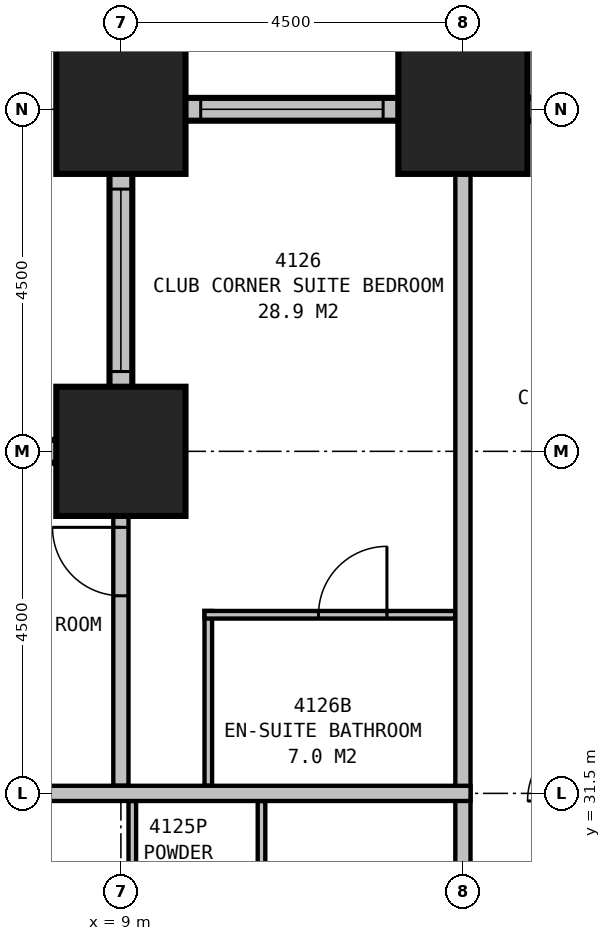
"""IFC4 building model, lengths in metres.
Left out: names, types, materials, properties, quantities, classifications, styles, units other than length and angle.
Written with IfcOpenShell. Run it as: python <this file> out.ifc"""

import sys

from ifc_helpers import new_model, si_unit, direction, frame, frame_2d, origin, origin_2d, place, context, subcontext, project, spatial, rectangle, extrude, element, fill, save


model = new_model("IFC4")
c1 = context("Model", 3, precision=1e-05, world=origin(), true_north=direction((0.0, 1.0)))
c2 = subcontext(c1, "Body", "Model", "MODEL_VIEW")
j1 = project(units=[si_unit("LENGTHUNIT", "METRE"), si_unit("PLANEANGLEUNIT", "RADIAN")], contexts=[c1])
p1 = place(None, origin())
s1 = spatial("IfcSite", under=j1, at=p1, CompositionType="ELEMENT")
p2 = place(p1, origin())
s2 = spatial("IfcBuilding", under=s1, at=p2, CompositionType="ELEMENT")
p3 = place(p2, frame((0.0, 0.0, 162.4)))
s3 = spatial("IfcBuildingStorey", under=s2, at=p3, CompositionType="ELEMENT", Elevation=162.4)
for number, where, z_axis, x_axis in (
    (1, (13.5, 40.5, 0.0), (0.0, 0.0, 1.0), (1.0, 0.0, 0.0)),
    (2, (9.0, 40.5, 0.0), (0.0, 0.0, 1.0), (1.0, 0.0, 0.0)),
    (3, (9.0, 36.0, 0.0), (0.0, 0.0, 1.0), (1.0, 0.0, 0.0)),
):
    element("IfcColumn", number, at=place(p3, frame(where, z_axis=z_axis, x_axis=x_axis)), inside=s3, PredefinedType="COLUMN", context=c2, shape_type="SweptSolid", body=[
        extrude(rectangle(XDim=1.7, YDim=1.7, at=origin_2d()), origin(), (0.0, 0.0, 1.0), 3.5),
    ])
p4 = place(p3, frame((40.65, 40.5, 0.0), z_axis=(0.0, 0.0, 1.0), x_axis=(-1.0, 0.0, 0.0)))
e4 = element("IfcWall", 4, at=p4, inside=s3, PredefinedType="STANDARD", context=c2, shape_type="SweptSolid", body=[
    extrude(rectangle(XDim=31.8, YDim=0.3, at=frame_2d((15.9, 0.0))), origin(), (0.0, 0.0, 1.0), 2.25),
])
p5 = place(p4, frame((1.2, 0.0, 0.5)))
e5 = element("IfcOpeningElement", 5, at=p5, cuts=e4, PredefinedType="OPENING", context=c2, shape_type="SweptSolid", body=[
    extrude(rectangle(XDim=2.4, YDim=1.6, at=frame_2d((1.2, 0.8))), frame((0.0, 0.16, 0.0), z_axis=(0.0, -1.0, 0.0), x_axis=(1.0, 0.0, 0.0)), (0.0, 0.0, 1.0), 0.32),
])
p6 = place(p4, frame((5.7, 0.0, 0.5)))
e6 = element("IfcOpeningElement", 6, at=p6, cuts=e4, PredefinedType="OPENING", context=c2, shape_type="SweptSolid", body=[
    extrude(rectangle(XDim=2.4, YDim=1.6, at=frame_2d((1.2, 0.8))), frame((0.0, 0.16, 0.0), z_axis=(0.0, -1.0, 0.0), x_axis=(1.0, 0.0, 0.0)), (0.0, 0.0, 1.0), 0.32),
])
p7 = place(p4, frame((10.2, 0.0, 0.5)))
e7 = element("IfcOpeningElement", 7, at=p7, cuts=e4, PredefinedType="OPENING", context=c2, shape_type="SweptSolid", body=[
    extrude(rectangle(XDim=2.4, YDim=1.6, at=frame_2d((1.2, 0.8))), frame((0.0, 0.16, 0.0), z_axis=(0.0, -1.0, 0.0), x_axis=(1.0, 0.0, 0.0)), (0.0, 0.0, 1.0), 0.32),
])
p8 = place(p4, frame((14.7, 0.0, 0.5)))
e8 = element("IfcOpeningElement", 8, at=p8, cuts=e4, PredefinedType="OPENING", context=c2, shape_type="SweptSolid", body=[
    extrude(rectangle(XDim=2.4, YDim=1.6, at=frame_2d((1.2, 0.8))), frame((0.0, 0.16, 0.0), z_axis=(0.0, -1.0, 0.0), x_axis=(1.0, 0.0, 0.0)), (0.0, 0.0, 1.0), 0.32),
])
p9 = place(p4, frame((19.2, 0.0, 0.5)))
e9 = element("IfcOpeningElement", 9, at=p9, cuts=e4, PredefinedType="OPENING", context=c2, shape_type="SweptSolid", body=[
    extrude(rectangle(XDim=2.4, YDim=1.6, at=frame_2d((1.2, 0.8))), frame((0.0, 0.16, 0.0), z_axis=(0.0, -1.0, 0.0), x_axis=(1.0, 0.0, 0.0)), (0.0, 0.0, 1.0), 0.32),
])
p10 = place(p4, frame((23.7, 0.0, 0.5)))
e10 = element("IfcOpeningElement", 10, at=p10, cuts=e4, PredefinedType="OPENING", context=c2, shape_type="SweptSolid", body=[
    extrude(rectangle(XDim=2.4, YDim=1.6, at=frame_2d((1.2, 0.8))), frame((0.0, 0.16, 0.0), z_axis=(0.0, -1.0, 0.0), x_axis=(1.0, 0.0, 0.0)), (0.0, 0.0, 1.0), 0.32),
])
p11 = place(p4, frame((28.2, 0.0, 0.5)))
e11 = element("IfcOpeningElement", 11, at=p11, cuts=e4, PredefinedType="OPENING", context=c2, shape_type="SweptSolid", body=[
    extrude(rectangle(XDim=2.4, YDim=1.6, at=frame_2d((1.2, 0.8))), frame((0.0, 0.16, 0.0), z_axis=(0.0, -1.0, 0.0), x_axis=(1.0, 0.0, 0.0)), (0.0, 0.0, 1.0), 0.32),
])
p12 = place(p3, frame((9.0, 40.65, 0.0), z_axis=(0.0, 0.0, 1.0), x_axis=(0.0, -1.0, 0.0)))
e12 = element("IfcWall", 12, at=p12, inside=s3, PredefinedType="STANDARD", context=c2, shape_type="SweptSolid", body=[
    extrude(rectangle(XDim=4.8, YDim=0.3, at=frame_2d((2.4, 0.0))), origin(), (0.0, 0.0, 1.0), 2.25),
])
p13 = place(p12, frame((1.2, 0.0, 0.5)))
e13 = element("IfcOpeningElement", 13, at=p13, cuts=e12, PredefinedType="OPENING", context=c2, shape_type="SweptSolid", body=[
    extrude(rectangle(XDim=2.4, YDim=1.6, at=frame_2d((1.2, 0.8))), frame((0.0, 0.16, 0.0), z_axis=(0.0, -1.0, 0.0), x_axis=(1.0, 0.0, 0.0)), (0.0, 0.0, 1.0), 0.32),
])
p14 = place(p3, frame((9.15, 36.0, 0.0), z_axis=(0.0, 0.0, 1.0), x_axis=(-1.0, 0.0, 0.0)))
e14 = element("IfcWall", 14, at=p14, inside=s3, PredefinedType="STANDARD", context=c2, shape_type="SweptSolid", body=[
    extrude(rectangle(XDim=5.3, YDim=0.3, at=frame_2d((2.65, 0.0))), origin(), (0.0, 0.0, 1.0), 2.25),
])
p15 = place(p14, frame((1.45, 0.0, 0.5)))
e15 = element("IfcOpeningElement", 15, at=p15, cuts=e14, PredefinedType="OPENING", context=c2, shape_type="SweptSolid", body=[
    extrude(rectangle(XDim=2.4, YDim=1.6, at=frame_2d((1.2, 0.8))), frame((0.0, 0.16, 0.0), z_axis=(0.0, -1.0, 0.0), x_axis=(1.0, 0.0, 0.0)), (0.0, 0.0, 1.0), 0.32),
])
p16 = place(p3, frame((13.5, 29.3, 0.0), z_axis=(0.0, 0.0, 1.0), x_axis=(0.0, 1.0, 0.0)))
e16 = element("IfcWall", 16, at=p16, inside=s3, PredefinedType="PARTITIONING", context=c2, shape_type="SweptSolid", body=[
    extrude(rectangle(XDim=11.2, YDim=0.2, at=frame_2d((5.6, 0.0))), origin(), (0.0, 0.0, 1.0), 2.25),
])
p17 = place(p3, frame((13.6, 31.5, 0.0), z_axis=(0.0, 0.0, 1.0), x_axis=(-1.0, 0.0, 0.0)))
e17 = element("IfcWall", 17, at=p17, inside=s3, PredefinedType="PARTITIONING", context=c2, shape_type="SweptSolid", body=[
    extrude(rectangle(XDim=10.099, YDim=0.2, at=frame_2d((5.05, 0.0))), origin(), (0.0, 0.0, 1.0), 3.25),
])
p18 = place(p17, frame((8.999, 0.0, 0.0), z_axis=(0.0, 0.0, 1.0), x_axis=(-1.0, 0.0, 0.0)))
e18 = element("IfcOpeningElement", 18, at=p18, cuts=e17, PredefinedType="OPENING", context=c2, shape_type="SweptSolid", body=[
    extrude(rectangle(XDim=0.9, YDim=2.1, at=frame_2d((0.45, 1.05))), frame((0.0, 0.11, 0.0), z_axis=(0.0, -1.0, 0.0), x_axis=(1.0, 0.0, 0.0)), (0.0, 0.0, 1.0), 0.22),
])
p19 = place(p3, frame((9.15, 31.4, 0.0), z_axis=(0.0, 0.0, 1.0), x_axis=(0.0, -1.0, 0.0)))
e19 = element("IfcWall", 19, at=p19, inside=s3, PredefinedType="PLUMBINGWALL", context=c2, shape_type="SweptSolid", body=[
    extrude(rectangle(XDim=2.0, YDim=0.1, at=frame_2d((1.0, 0.0))), origin(), (0.0, 0.0, 1.0), 2.25),
])
p20 = place(p3, frame((10.85, 31.4, 0.0), z_axis=(0.0, 0.0, 1.0), x_axis=(0.0, -1.0, 0.0)))
e20 = element("IfcWall", 20, at=p20, inside=s3, PredefinedType="PLUMBINGWALL", context=c2, shape_type="SweptSolid", body=[
    extrude(rectangle(XDim=2.0, YDim=0.1, at=frame_2d((1.0, 0.0))), origin(), (0.0, 0.0, 1.0), 3.25),
])
p21 = place(p3, frame((9.0, 31.6, 0.0), z_axis=(0.0, 0.0, 1.0), x_axis=(0.0, 1.0, 0.0)))
e21 = element("IfcWall", 21, at=p21, inside=s3, PredefinedType="PARTITIONING", context=c2, shape_type="SweptSolid", body=[
    extrude(rectangle(XDim=4.4, YDim=0.2, at=frame_2d((2.2, 0.0))), origin(), (0.0, 0.0, 1.0), 2.25),
])
p22 = place(p21, frame((2.5, 0.0, 0.0)))
e22 = element("IfcOpeningElement", 22, at=p22, cuts=e21, PredefinedType="OPENING", context=c2, shape_type="SweptSolid", body=[
    extrude(rectangle(XDim=0.9, YDim=2.1, at=frame_2d((0.45, 1.05))), frame((0.0, 0.11, 0.0), z_axis=(0.0, -1.0, 0.0), x_axis=(1.0, 0.0, 0.0)), (0.0, 0.0, 1.0), 0.22),
])
p23 = place(p3, frame((10.15, 31.6, 0.0), z_axis=(0.0, 0.0, 1.0), x_axis=(0.0, 1.0, 0.0)))
e23 = element("IfcWall", 23, at=p23, inside=s3, PredefinedType="PLUMBINGWALL", context=c2, shape_type="SweptSolid", body=[
    extrude(rectangle(XDim=2.3, YDim=0.1, at=frame_2d((1.15, 0.0))), origin(), (0.0, 0.0, 1.0), 3.25),
])
p24 = place(p3, frame((13.4, 33.85, 0.0), z_axis=(0.0, 0.0, 1.0), x_axis=(-1.0, 0.0, 0.0)))
e24 = element("IfcWall", 24, at=p24, inside=s3, PredefinedType="PLUMBINGWALL", context=c2, shape_type="SweptSolid", body=[
    extrude(rectangle(XDim=3.3, YDim=0.1, at=frame_2d((1.65, 0.0))), origin(), (0.0, 0.0, 1.0), 3.25),
])
p25 = place(p24, frame((1.8, 0.0, 0.0), z_axis=(0.0, 0.0, 1.0), x_axis=(-1.0, 0.0, 0.0)))
e25 = element("IfcOpeningElement", 25, at=p25, cuts=e24, PredefinedType="OPENING", context=c2, shape_type="SweptSolid", body=[
    extrude(rectangle(XDim=0.9, YDim=2.1, at=frame_2d((0.45, 1.05))), frame((0.0, 0.06, 0.0), z_axis=(0.0, -1.0, 0.0), x_axis=(1.0, 0.0, 0.0)), (0.0, 0.0, 1.0), 0.12),
])
p26 = place(p11, origin())
e26 = element("IfcWindow", 26, at=p26, inside=s3, PartitioningType="SINGLE_PANEL", PredefinedType="WINDOW", context=c2, shape_type="SweptSolid", body=[
    extrude(rectangle(XDim=2.4, YDim=1.6, at=frame_2d((1.2, 0.8))), frame((0.0, 0.03, 0.0), z_axis=(0.0, -1.0, 0.0), x_axis=(1.0, 0.0, 0.0)), (0.0, 0.0, 1.0), 0.06),
])
fill(e11, e26)
p27 = place(p13, origin())
e27 = element("IfcWindow", 27, at=p27, inside=s3, PartitioningType="SINGLE_PANEL", PredefinedType="WINDOW", context=c2, shape_type="SweptSolid", body=[
    extrude(rectangle(XDim=2.4, YDim=1.6, at=frame_2d((1.2, 0.8))), frame((0.0, 0.03, 0.0), z_axis=(0.0, -1.0, 0.0), x_axis=(1.0, 0.0, 0.0)), (0.0, 0.0, 1.0), 0.06),
])
fill(e13, e27)
p28 = place(p22, origin())
e28 = element("IfcDoor", 28, at=p28, inside=s3, OperationType="SINGLE_SWING_RIGHT", PredefinedType="DOOR", context=c2, shape_type="SweptSolid", body=[
    extrude(rectangle(XDim=0.9, YDim=2.1, at=frame_2d((0.45, 1.05))), frame((0.0, 0.025, 0.0), z_axis=(0.0, -1.0, 0.0), x_axis=(1.0, 0.0, 0.0)), (0.0, 0.0, 1.0), 0.05),
])
fill(e22, e28)
p29 = place(p25, origin())
e29 = element("IfcDoor", 29, at=p29, inside=s3, OperationType="SINGLE_SWING_RIGHT", PredefinedType="DOOR", context=c2, shape_type="SweptSolid", body=[
    extrude(rectangle(XDim=0.9, YDim=2.1, at=frame_2d((0.45, 1.05))), frame((0.0, 0.025, 0.0), z_axis=(0.0, -1.0, 0.0), x_axis=(1.0, 0.0, 0.0)), (0.0, 0.0, 1.0), 0.05),
])
fill(e25, e29)
save(model, sys.argv[1])
